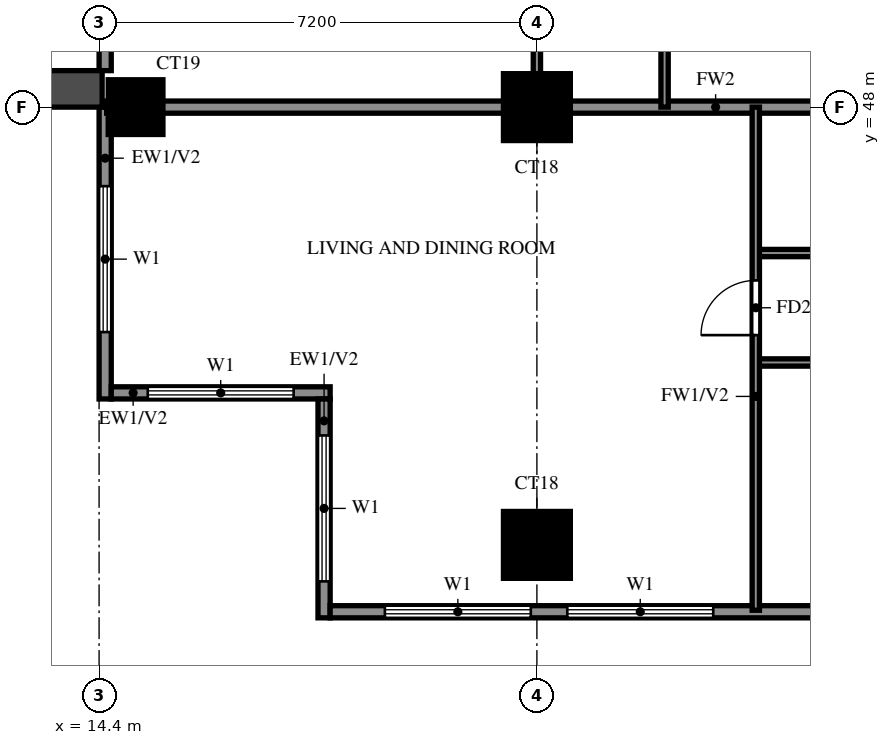
"""IFC4 building model, lengths in metres.
Left out: names, types, materials, properties, quantities, classifications, styles, units other than length and angle.
Written with IfcOpenShell. Run it as: python <this file> out.ifc"""

import sys

from ifc_helpers import new_model, si_unit, direction, frame, frame_2d, origin, origin_2d, place, context, subcontext, project, spatial, rectangle, extrude, source, transform, mapped, element, fill, save


model = new_model("IFC4")
c1 = context("Model", 3, precision=1e-05, world=origin(), true_north=direction((0.0, 1.0)))
c2 = subcontext(c1, "Body", "Model", "MODEL_VIEW")
j1 = project(units=[si_unit("LENGTHUNIT", "METRE"), si_unit("PLANEANGLEUNIT", "RADIAN")], contexts=[c1])
p1 = place(None, origin())
s1 = spatial("IfcSite", under=j1, at=p1, CompositionType="ELEMENT")
p2 = place(p1, origin())
s2 = spatial("IfcBuilding", under=s1, at=p2, CompositionType="ELEMENT")
p3 = place(p2, frame((0.0, 0.0, 130.5)))
s3 = spatial("IfcBuildingStorey", under=s2, at=p3, CompositionType="ELEMENT", Elevation=130.5)
m1 = source(origin(), c2, "Body", "SweptSolid", [
    extrude(rectangle(XDim=1.1, YDim=1.1, at=origin_2d()), origin(), (0.0, 0.0, 1.0), 3.2),
])
p4 = place(p3, frame((21.6, 40.8, 0.0), z_axis=(0.0, 0.0, 1.0), x_axis=(1.0, 0.0, 0.0)))
e1 = element("IfcColumn", 1, at=p4, inside=s3, PredefinedType="COLUMN", context=c2, shape_type="MappedRepresentation", body=[
    mapped(m1, transform((0.0, 0.0, 0.0))),
])
m2 = source(origin(), c2, "Body", "SweptSolid", [
    extrude(rectangle(XDim=0.9, YDim=0.9, at=origin_2d()), origin(), (0.0, 0.0, 1.0), 3.2),
])
p5 = place(p3, frame((15.0, 48.0, 0.0), z_axis=(0.0, 0.0, 1.0), x_axis=(1.0, 0.0, 0.0)))
e2 = element("IfcColumn", 2, at=p5, inside=s3, PredefinedType="COLUMN", context=c2, shape_type="MappedRepresentation", body=[
    mapped(m2, transform((0.0, 0.0, 0.0))),
])
p6 = place(p3, frame((21.6, 48.0, 0.0), z_axis=(0.0, 0.0, 1.0), x_axis=(1.0, 0.0, 0.0)))
e3 = element("IfcColumn", 3, at=p6, inside=s3, PredefinedType="COLUMN", context=c2, shape_type="MappedRepresentation", body=[
    mapped(m1, transform((0.0, 0.0, 0.0))),
])
p7 = place(p3, frame((14.5, 54.6, 0.0), z_axis=(0.0, 0.0, 1.0), x_axis=(0.0, -1.0, 0.0)))
e4 = element("IfcWall", 4, at=p7, inside=s3, PredefinedType="SOLIDWALL", context=c2, shape_type="SweptSolid", body=[
    extrude(rectangle(XDim=6.0, YDim=0.2, at=frame_2d((3.0, 0.0))), origin(), (0.0, 0.0, 1.0), 3.2),
])
p8 = place(p7, frame((0.9, 0.0, 0.0)))
e5 = element("IfcOpeningElement", 5, at=p8, cuts=e4, PredefinedType="OPENING", context=c2, shape_type="SweptSolid", body=[
    extrude(rectangle(XDim=1.8, YDim=2.4, at=frame_2d((0.9, 1.2))), frame((0.0, 0.11, 0.0), z_axis=(0.0, -1.0, 0.0), x_axis=(1.0, 0.0, 0.0)), (0.0, 0.0, 1.0), 0.22),
])
p9 = place(p7, frame((3.5, 0.0, 0.6)))
e6 = element("IfcOpeningElement", 6, at=p9, cuts=e4, PredefinedType="OPENING", context=c2, shape_type="SweptSolid", body=[
    extrude(rectangle(XDim=1.8, YDim=2.4, at=frame_2d((0.9, 1.2))), frame((0.0, 0.11, 0.0), z_axis=(0.0, -1.0, 0.0), x_axis=(1.0, 0.0, 0.0)), (0.0, 0.0, 1.0), 0.22),
])
p10 = place(p3, frame((14.5, 48.0, 0.0), z_axis=(0.0, 0.0, 1.0), x_axis=(0.0, -1.0, 0.0)))
e7 = element("IfcWall", 7, at=p10, inside=s3, PredefinedType="SOLIDWALL", context=c2, shape_type="SweptSolid", body=[
    extrude(rectangle(XDim=4.8, YDim=0.2, at=frame_2d((2.4, 0.0))), origin(), (0.0, 0.0, 1.0), 3.2),
])
p11 = place(p10, frame((1.3, 0.0, 0.6)))
e8 = element("IfcOpeningElement", 8, at=p11, cuts=e7, PredefinedType="OPENING", context=c2, shape_type="SweptSolid", body=[
    extrude(rectangle(XDim=2.4, YDim=2.4, at=frame_2d((1.2, 1.2))), frame((0.0, 0.11, 0.0), z_axis=(0.0, -1.0, 0.0), x_axis=(1.0, 0.0, 0.0)), (0.0, 0.0, 1.0), 0.22),
])
p12 = place(p3, frame((14.6, 43.3, 0.0), z_axis=(0.0, 0.0, 1.0), x_axis=(1.0, 0.0, 0.0)))
e9 = element("IfcWall", 9, at=p12, inside=s3, PredefinedType="SOLIDWALL", context=c2, shape_type="SweptSolid", body=[
    extrude(rectangle(XDim=3.6, YDim=0.2, at=frame_2d((1.8, 0.0))), origin(), (0.0, 0.0, 1.0), 3.2),
])
p13 = place(p12, frame((0.6, 0.0, 0.6)))
e10 = element("IfcOpeningElement", 10, at=p13, cuts=e9, PredefinedType="OPENING", context=c2, shape_type="SweptSolid", body=[
    extrude(rectangle(XDim=2.4, YDim=2.4, at=frame_2d((1.2, 1.2))), frame((0.0, 0.11, 0.0), z_axis=(0.0, -1.0, 0.0), x_axis=(1.0, 0.0, 0.0)), (0.0, 0.0, 1.0), 0.22),
])
p14 = place(p3, frame((18.1, 43.2, 0.0), z_axis=(0.0, 0.0, 1.0), x_axis=(0.0, -1.0, 0.0)))
e11 = element("IfcWall", 11, at=p14, inside=s3, PredefinedType="SOLIDWALL", context=c2, shape_type="SweptSolid", body=[
    extrude(rectangle(XDim=3.6, YDim=0.2, at=frame_2d((1.8, 0.0))), origin(), (0.0, 0.0, 1.0), 3.2),
])
p15 = place(p14, frame((0.6, 0.0, 0.6)))
e12 = element("IfcOpeningElement", 12, at=p15, cuts=e11, PredefinedType="OPENING", context=c2, shape_type="SweptSolid", body=[
    extrude(rectangle(XDim=2.4, YDim=2.4, at=frame_2d((1.2, 1.2))), frame((0.0, 0.11, 0.0), z_axis=(0.0, -1.0, 0.0), x_axis=(1.0, 0.0, 0.0)), (0.0, 0.0, 1.0), 0.22),
])
p16 = place(p3, frame((18.2, 39.7, 0.0), z_axis=(0.0, 0.0, 1.0), x_axis=(1.0, 0.0, 0.0)))
e13 = element("IfcWall", 13, at=p16, inside=s3, PredefinedType="SOLIDWALL", context=c2, shape_type="SweptSolid", body=[
    extrude(rectangle(XDim=23.8, YDim=0.2, at=frame_2d((11.9, 0.0))), origin(), (0.0, 0.0, 1.0), 3.2),
])
p17 = place(p16, frame((13.3, 0.0, 0.0)))
e14 = element("IfcOpeningElement", 14, at=p17, cuts=e13, PredefinedType="OPENING", context=c2, shape_type="SweptSolid", body=[
    extrude(rectangle(XDim=1.8, YDim=2.4, at=frame_2d((0.9, 1.2))), frame((0.0, 0.11, 0.0), z_axis=(0.0, -1.0, 0.0), x_axis=(1.0, 0.0, 0.0)), (0.0, 0.0, 1.0), 0.22),
])
p18 = place(p16, frame((0.9, 0.0, 0.6)))
e15 = element("IfcOpeningElement", 15, at=p18, cuts=e13, PredefinedType="OPENING", context=c2, shape_type="SweptSolid", body=[
    extrude(rectangle(XDim=2.4, YDim=2.4, at=frame_2d((1.2, 1.2))), frame((0.0, 0.11, 0.0), z_axis=(0.0, -1.0, 0.0), x_axis=(1.0, 0.0, 0.0)), (0.0, 0.0, 1.0), 0.22),
])
p19 = place(p16, frame((3.9, 0.0, 0.6)))
e16 = element("IfcOpeningElement", 16, at=p19, cuts=e13, PredefinedType="OPENING", context=c2, shape_type="SweptSolid", body=[
    extrude(rectangle(XDim=2.4, YDim=2.4, at=frame_2d((1.2, 1.2))), frame((0.0, 0.11, 0.0), z_axis=(0.0, -1.0, 0.0), x_axis=(1.0, 0.0, 0.0)), (0.0, 0.0, 1.0), 0.22),
])
p20 = place(p16, frame((8.35, 0.0, 1.5)))
e17 = element("IfcOpeningElement", 17, at=p20, cuts=e13, PredefinedType="OPENING", context=c2, shape_type="SweptSolid", body=[
    extrude(rectangle(XDim=0.9, YDim=0.9, at=frame_2d((0.45, 0.45))), frame((0.0, 0.11, 0.0), z_axis=(0.0, -1.0, 0.0), x_axis=(1.0, 0.0, 0.0)), (0.0, 0.0, 1.0), 0.22),
])
p21 = place(p16, frame((10.9, 0.0, 0.6)))
e18 = element("IfcOpeningElement", 18, at=p21, cuts=e13, PredefinedType="OPENING", context=c2, shape_type="SweptSolid", body=[
    extrude(rectangle(XDim=1.8, YDim=2.4, at=frame_2d((0.9, 1.2))), frame((0.0, 0.11, 0.0), z_axis=(0.0, -1.0, 0.0), x_axis=(1.0, 0.0, 0.0)), (0.0, 0.0, 1.0), 0.22),
])
p22 = place(p3, frame((14.45, 48.3, 0.0), z_axis=(0.0, 0.0, 1.0), x_axis=(-1.0, 0.0, 0.0)))
e19 = element("IfcWall", 19, at=p22, inside=s3, PredefinedType="SOLIDWALL", context=c2, shape_type="SweptSolid", body=[
    extrude(rectangle(XDim=2.75, YDim=0.6, at=frame_2d((1.375, 0.0))), origin(), (0.0, 0.0, 1.0), 2.85),
])
p23 = place(p3, frame((14.525, 48.0, 0.0), z_axis=(0.0, 0.0, 1.0), x_axis=(1.0, 0.0, 0.0)))
e20 = element("IfcWall", 20, at=p23, inside=s3, PredefinedType="SOLIDWALL", context=c2, shape_type="SweptSolid", body=[
    extrude(rectangle(XDim=19.075, YDim=0.2, at=frame_2d((9.538, 0.0))), origin(), (0.0, 0.0, 1.0), 3.2),
])
p24 = place(p3, frame((25.2, 43.8, 0.0), z_axis=(0.0, 0.0, 1.0), x_axis=(1.0, 0.0, 0.0)))
e21 = element("IfcWall", 21, at=p24, inside=s3, PredefinedType="PARTITIONING", context=c2, shape_type="SweptSolid", body=[
    extrude(rectangle(XDim=8.4, YDim=0.12, at=frame_2d((4.2, 0.0))), origin(), (0.0, 0.0, 1.0), 3.2),
])
p25 = place(p24, frame((1.35, 0.0, 0.0)))
e22 = element("IfcOpeningElement", 22, at=p25, cuts=e21, PredefinedType="OPENING", context=c2, shape_type="SweptSolid", body=[
    extrude(rectangle(XDim=0.9, YDim=2.1, at=frame_2d((0.45, 1.05))), frame((0.0, 0.07, 0.0), z_axis=(0.0, -1.0, 0.0), x_axis=(1.0, 0.0, 0.0)), (0.0, 0.0, 1.0), 0.14),
])
p26 = place(p24, frame((5.55, 0.0, 0.0)))
e23 = element("IfcOpeningElement", 23, at=p26, cuts=e21, PredefinedType="OPENING", context=c2, shape_type="SweptSolid", body=[
    extrude(rectangle(XDim=0.9, YDim=2.1, at=frame_2d((0.45, 1.05))), frame((0.0, 0.07, 0.0), z_axis=(0.0, -1.0, 0.0), x_axis=(1.0, 0.0, 0.0)), (0.0, 0.0, 1.0), 0.14),
])
p27 = place(p3, frame((25.2, 45.6, 0.0), z_axis=(0.0, 0.0, 1.0), x_axis=(1.0, 0.0, 0.0)))
e24 = element("IfcWall", 24, at=p27, inside=s3, PredefinedType="PARTITIONING", context=c2, shape_type="SweptSolid", body=[
    extrude(rectangle(XDim=6.0, YDim=0.12, at=frame_2d((3.0, 0.0))), origin(), (0.0, 0.0, 1.0), 3.2),
])
p28 = place(p27, frame((2.55, 0.0, 0.0)))
e25 = element("IfcOpeningElement", 25, at=p28, cuts=e24, PredefinedType="OPENING", context=c2, shape_type="SweptSolid", body=[
    extrude(rectangle(XDim=0.9, YDim=2.1, at=frame_2d((0.45, 1.05))), frame((0.0, 0.07, 0.0), z_axis=(0.0, -1.0, 0.0), x_axis=(1.0, 0.0, 0.0)), (0.0, 0.0, 1.0), 0.14),
])
p29 = place(p3, frame((21.6, 48.0, 0.0), z_axis=(0.0, 0.0, 1.0), x_axis=(0.0, 1.0, 0.0)))
e26 = element("IfcWall", 26, at=p29, inside=s3, PredefinedType="PARTITIONING", context=c2, shape_type="SweptSolid", body=[
    extrude(rectangle(XDim=21.6, YDim=0.12, at=frame_2d((10.8, 0.0))), origin(), (0.0, 0.0, 1.0), 3.2),
])
p30 = place(p29, frame((1.35, 0.0, 0.0)))
e27 = element("IfcOpeningElement", 27, at=p30, cuts=e26, PredefinedType="OPENING", context=c2, shape_type="SweptSolid", body=[
    extrude(rectangle(XDim=0.9, YDim=2.1, at=frame_2d((0.45, 1.05))), frame((0.0, 0.07, 0.0), z_axis=(0.0, -1.0, 0.0), x_axis=(1.0, 0.0, 0.0)), (0.0, 0.0, 1.0), 0.14),
])
p31 = place(p29, frame((7.95, 0.0, 0.0)))
e28 = element("IfcOpeningElement", 28, at=p31, cuts=e26, PredefinedType="OPENING", context=c2, shape_type="SweptSolid", body=[
    extrude(rectangle(XDim=1.5, YDim=2.1, at=frame_2d((0.75, 1.05))), frame((0.0, 0.07, 0.0), z_axis=(0.0, -1.0, 0.0), x_axis=(1.0, 0.0, 0.0)), (0.0, 0.0, 1.0), 0.14),
])
p32 = place(p29, frame((12.15, 0.0, 0.0)))
e29 = element("IfcOpeningElement", 29, at=p32, cuts=e26, PredefinedType="OPENING", context=c2, shape_type="SweptSolid", body=[
    extrude(rectangle(XDim=0.9, YDim=2.1, at=frame_2d((0.45, 1.05))), frame((0.0, 0.07, 0.0), z_axis=(0.0, -1.0, 0.0), x_axis=(1.0, 0.0, 0.0)), (0.0, 0.0, 1.0), 0.14),
])
p33 = place(p29, frame((17.55, 0.0, 0.0)))
e30 = element("IfcOpeningElement", 30, at=p33, cuts=e26, PredefinedType="OPENING", context=c2, shape_type="SweptSolid", body=[
    extrude(rectangle(XDim=0.9, YDim=2.1, at=frame_2d((0.45, 1.05))), frame((0.0, 0.07, 0.0), z_axis=(0.0, -1.0, 0.0), x_axis=(1.0, 0.0, 0.0)), (0.0, 0.0, 1.0), 0.14),
])
p34 = place(p3, frame((23.7, 48.0, 0.0), z_axis=(0.0, 0.0, 1.0), x_axis=(0.0, 1.0, 0.0)))
e31 = element("IfcWall", 31, at=p34, inside=s3, PredefinedType="PARTITIONING", context=c2, shape_type="SweptSolid", body=[
    extrude(rectangle(XDim=3.6, YDim=0.12, at=frame_2d((1.8, 0.0))), origin(), (0.0, 0.0, 1.0), 3.2),
])
p35 = place(p3, frame((25.2, 39.725, 0.0), z_axis=(0.0, 0.0, 1.0), x_axis=(0.0, 1.0, 0.0)))
e32 = element("IfcWall", 32, at=p35, inside=s3, PredefinedType="PARTITIONING", context=c2, shape_type="SweptSolid", body=[
    extrude(rectangle(XDim=8.275, YDim=0.12, at=frame_2d((4.137, 0.0))), origin(), (0.0, 0.0, 1.0), 3.2),
])
p36 = place(p35, frame((4.525, 0.0, 0.0)))
e33 = element("IfcOpeningElement", 33, at=p36, cuts=e32, PredefinedType="OPENING", context=c2, shape_type="SweptSolid", body=[
    extrude(rectangle(XDim=0.9, YDim=2.1, at=frame_2d((0.45, 1.05))), frame((0.0, 0.07, 0.0), z_axis=(0.0, -1.0, 0.0), x_axis=(1.0, 0.0, 0.0)), (0.0, 0.0, 1.0), 0.14),
])
p37 = place(p11, origin())
e34 = element("IfcWindow", 34, at=p37, inside=s3, PartitioningType="DOUBLE_PANEL_VERTICAL", PredefinedType="WINDOW", context=c2, shape_type="SweptSolid", body=[
    extrude(rectangle(XDim=2.4, YDim=2.4, at=frame_2d((1.2, 1.2))), frame((0.0, 0.03, 0.0), z_axis=(0.0, -1.0, 0.0), x_axis=(1.0, 0.0, 0.0)), (0.0, 0.0, 1.0), 0.06),
])
fill(e8, e34)
p38 = place(p13, origin())
e35 = element("IfcWindow", 35, at=p38, inside=s3, PartitioningType="DOUBLE_PANEL_VERTICAL", PredefinedType="WINDOW", context=c2, shape_type="SweptSolid", body=[
    extrude(rectangle(XDim=2.4, YDim=2.4, at=frame_2d((1.2, 1.2))), frame((0.0, 0.03, 0.0), z_axis=(0.0, -1.0, 0.0), x_axis=(1.0, 0.0, 0.0)), (0.0, 0.0, 1.0), 0.06),
])
fill(e10, e35)
p39 = place(p15, origin())
e36 = element("IfcWindow", 36, at=p39, inside=s3, PartitioningType="DOUBLE_PANEL_VERTICAL", PredefinedType="WINDOW", context=c2, shape_type="SweptSolid", body=[
    extrude(rectangle(XDim=2.4, YDim=2.4, at=frame_2d((1.2, 1.2))), frame((0.0, 0.03, 0.0), z_axis=(0.0, -1.0, 0.0), x_axis=(1.0, 0.0, 0.0)), (0.0, 0.0, 1.0), 0.06),
])
fill(e12, e36)
p40 = place(p18, origin())
e37 = element("IfcWindow", 37, at=p40, inside=s3, PartitioningType="DOUBLE_PANEL_VERTICAL", PredefinedType="WINDOW", context=c2, shape_type="SweptSolid", body=[
    extrude(rectangle(XDim=2.4, YDim=2.4, at=frame_2d((1.2, 1.2))), frame((0.0, 0.03, 0.0), z_axis=(0.0, -1.0, 0.0), x_axis=(1.0, 0.0, 0.0)), (0.0, 0.0, 1.0), 0.06),
])
fill(e15, e37)
p41 = place(p19, origin())
e38 = element("IfcWindow", 38, at=p41, inside=s3, PartitioningType="DOUBLE_PANEL_VERTICAL", PredefinedType="WINDOW", context=c2, shape_type="SweptSolid", body=[
    extrude(rectangle(XDim=2.4, YDim=2.4, at=frame_2d((1.2, 1.2))), frame((0.0, 0.03, 0.0), z_axis=(0.0, -1.0, 0.0), x_axis=(1.0, 0.0, 0.0)), (0.0, 0.0, 1.0), 0.06),
])
fill(e16, e38)
p42 = place(p36, origin())
e39 = element("IfcDoor", 39, at=p42, inside=s3, OperationType="SINGLE_SWING_LEFT", PredefinedType="DOOR", context=c2, shape_type="SweptSolid", body=[
    extrude(rectangle(XDim=0.9, YDim=2.1, at=frame_2d((0.45, 1.05))), frame((0.0, 0.025, 0.0), z_axis=(0.0, -1.0, 0.0), x_axis=(1.0, 0.0, 0.0)), (0.0, 0.0, 1.0), 0.05),
])
fill(e33, e39)
save(model, sys.argv[1])
